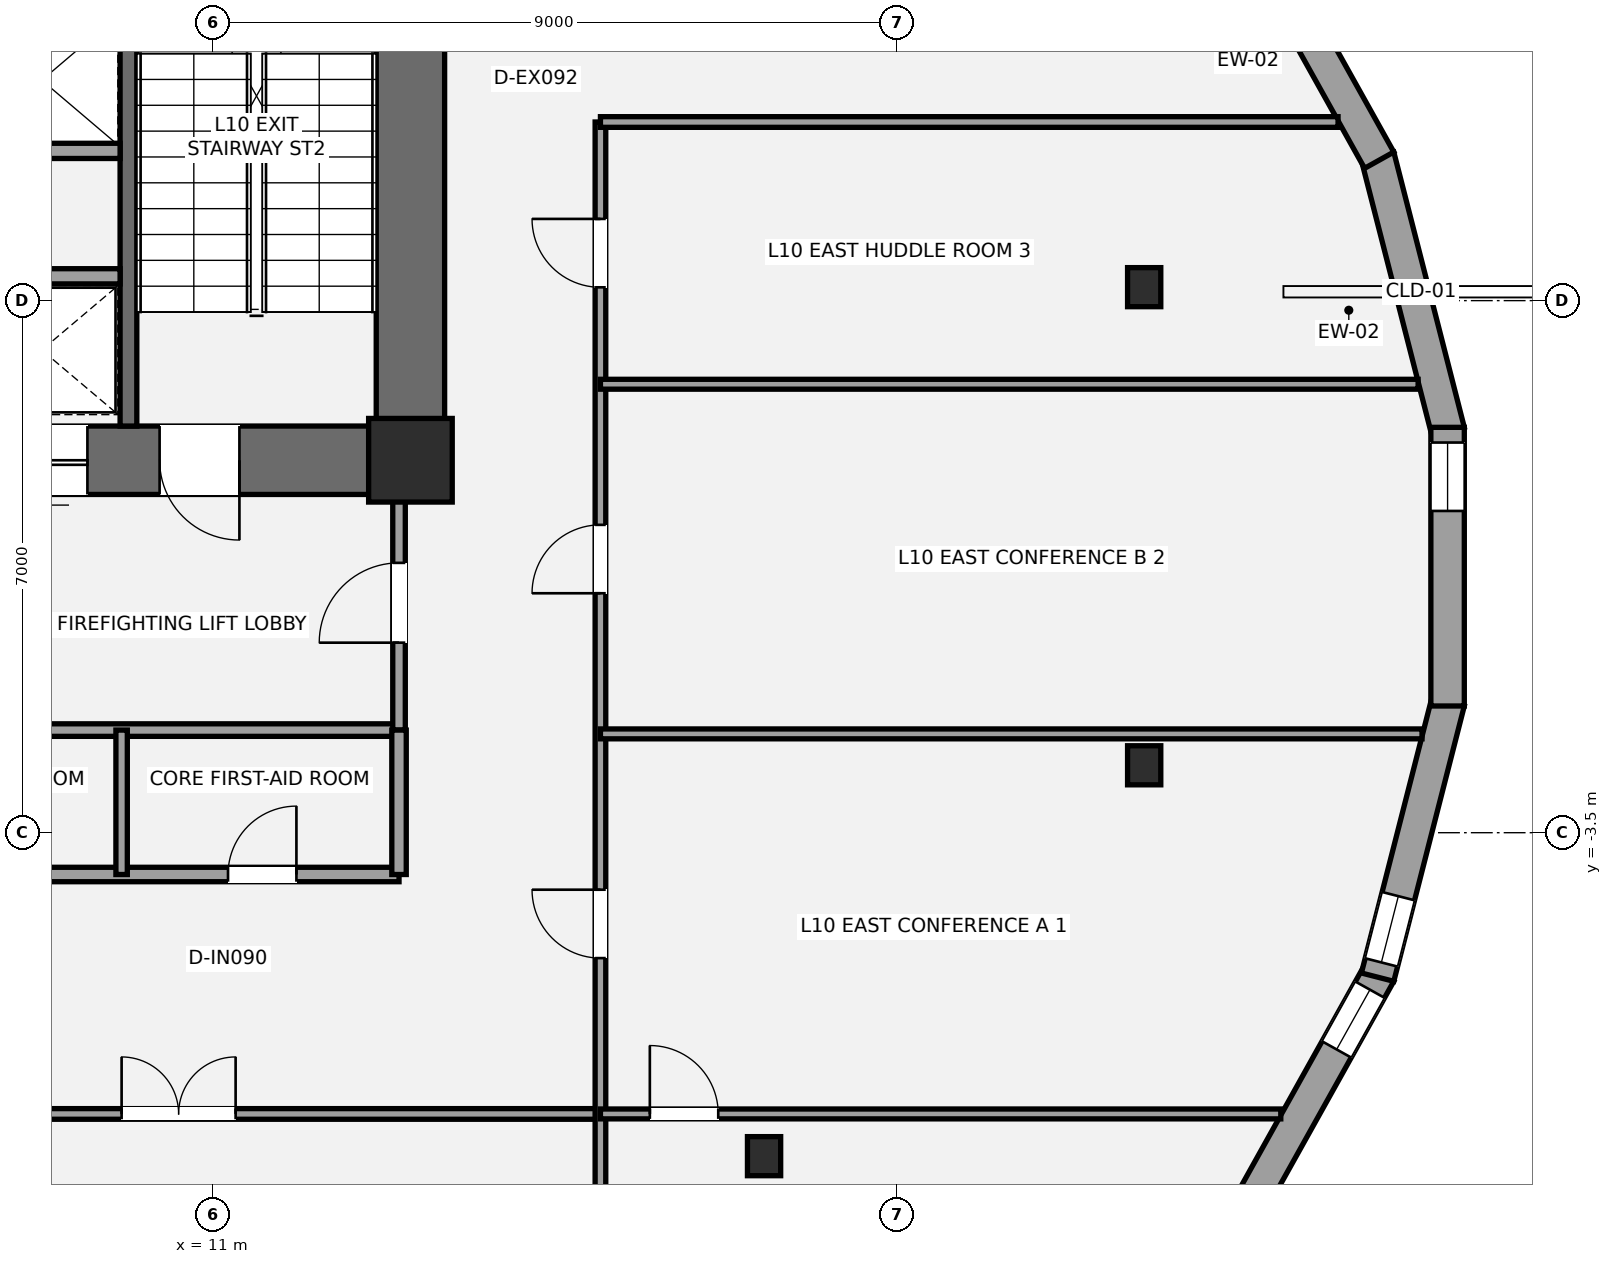
"""IFC4 building model, lengths in metres.
Left out: names, types, materials, properties, quantities, classifications, styles, units other than length and angle.
Written with IfcOpenShell. Run it as: python <this file> out.ifc"""

import sys

from ifc_helpers import new_model, si_unit, direction, frame, frame_2d, origin, origin_2d, place, context, subcontext, project, spatial, rectangle, i_section, extrude, element, fill, save


model = new_model("IFC4")
c1 = context("Model", 3, precision=1e-05, world=origin(), true_north=direction((0.0, 1.0)))
c2 = subcontext(c1, "Body", "Model", "MODEL_VIEW")
j1 = project(units=[si_unit("LENGTHUNIT", "METRE"), si_unit("PLANEANGLEUNIT", "RADIAN")], contexts=[c1])
p1 = place(None, origin())
s1 = spatial("IfcSite", under=j1, at=p1, CompositionType="ELEMENT")
p2 = place(p1, origin())
s2 = spatial("IfcBuilding", under=s1, at=p2, CompositionType="ELEMENT")
p3 = place(p2, frame((0.0, 0.0, 41.4)))
s3 = spatial("IfcBuildingStorey", under=s2, at=p3, CompositionType="ELEMENT", Elevation=41.4)
p4 = place(p3, frame((13.6, 0.95, 0.0), z_axis=(0.0, 0.0, 1.0), x_axis=(0.0, 1.0, 0.0)))
e1 = element("IfcWall", 1, at=p4, inside=s3, PredefinedType="SHEAR", context=c2, shape_type="SweptSolid", body=[
    extrude(rectangle(XDim=8.95, YDim=0.9, at=frame_2d((4.475, 0.0))), origin(), (0.0, 0.0, 1.0), 3.6),
])
p5 = place(p3, frame((14.05, 1.4, 0.0), z_axis=(0.0, 0.0, 1.0), x_axis=(-1.0, 0.0, 0.0)))
e2 = element("IfcWall", 2, at=p5, inside=s3, PredefinedType="SHEAR", context=c2, shape_type="SweptSolid", body=[
    extrude(rectangle(XDim=9.3, YDim=0.9, at=frame_2d((4.65, 0.0))), origin(), (0.0, 0.0, 1.0), 3.6),
])
p6 = place(p5, frame((2.7, 0.0, 0.0)))
e3 = element("IfcOpeningElement", 3, at=p6, cuts=e2, PredefinedType="OPENING", context=c2, shape_type="SweptSolid", body=[
    extrude(rectangle(XDim=1.05, YDim=2.15, at=frame_2d((0.525, 1.075))), frame((0.0, 0.46, 0.0), z_axis=(0.0, -1.0, 0.0), x_axis=(1.0, 0.0, 0.0)), (0.0, 0.0, 1.0), 0.92),
])
p7 = place(p5, frame((4.7, 0.0, 0.0)))
e4 = element("IfcOpeningElement", 4, at=p7, cuts=e2, PredefinedType="OPENING", context=c2, shape_type="SweptSolid", body=[
    extrude(rectangle(XDim=1.1, YDim=2.2, at=frame_2d((0.55, 1.1))), frame((0.0, 0.46, 0.0), z_axis=(0.0, -1.0, 0.0), x_axis=(1.0, 0.0, 0.0)), (0.0, 0.0, 1.0), 0.92),
])
p8 = place(p3, frame((9.89, 1.85, 0.0), z_axis=(0.0, 0.0, 1.0), x_axis=(0.0, 1.0, 0.0)))
e5 = element("IfcWall", 5, at=p8, inside=s3, PredefinedType="SHEAR", context=c2, shape_type="SweptSolid", body=[
    extrude(rectangle(XDim=7.15, YDim=0.22, at=frame_2d((3.575, 0.0))), origin(), (0.0, 0.0, 1.0), 3.6),
])
p9 = place(p3, frame((13.6, 1.4, 0.0), z_axis=(0.0, 0.0, 1.0), x_axis=(1.0, 0.0, 0.0)))
e6 = element("IfcColumn", 6, at=p9, inside=s3, PredefinedType="COLUMN", context=c2, shape_type="SweptSolid", body=[
    extrude(rectangle(XDim=1.1, YDim=1.1, at=origin_2d()), origin(), (0.0, 0.0, 1.0), 3.6),
])
for number, where, z_axis, x_axis in (
    (7, (23.254, 3.677, 0.0), (0.0, 0.0, 1.0), (1.0, 0.0, 0.0)),
    (8, (18.253, -7.756, 0.0), (0.0, 0.0, 1.0), (1.0, 0.0, 0.0)),
    (9, (23.254, -2.613, 0.0), (0.0, 0.0, 1.0), (1.0, 0.0, 0.0)),
):
    element("IfcColumn", number, at=place(p3, frame(where, z_axis=z_axis, x_axis=x_axis)), inside=s3, PredefinedType="COLUMN", context=c2, shape_type="SweptSolid", body=[
        extrude(i_section(OverallWidth=0.437, OverallDepth=0.514, WebThickness=0.061, FlangeThickness=0.097, at=origin_2d()), origin(), (0.0, 0.0, 1.0), 3.6),
    ])
p10 = place(p3, frame((26.325, 5.4, 0.0), z_axis=(0.0, 0.0, 1.0), x_axis=(0.248062710061, -0.968743976434, 0.0)))
e10 = element("IfcWall", 10, at=p10, inside=s3, PredefinedType="STANDARD", context=c2, shape_type="SweptSolid", body=[
    extrude(rectangle(XDim=3.739, YDim=0.44, at=frame_2d((1.87, 0.0))), origin(), (0.0, 0.0, 1.0), 2.529),
])
p11 = place(p3, frame((24.416, 8.806, 0.0), z_axis=(0.0, 0.0, 1.0), x_axis=(0.487369438963, -0.873195871477, 0.0)))
e11 = element("IfcWall", 11, at=p11, inside=s3, PredefinedType="STANDARD", context=c2, shape_type="SweptSolid", body=[
    extrude(rectangle(XDim=3.96, YDim=0.44, at=frame_2d((1.98, 0.0))), origin(), (0.0, 0.0, 1.0), 2.529),
])
p12 = place(p11, frame((0.249, 0.0, 0.58)))
e12 = element("IfcOpeningElement", 12, at=p12, cuts=e11, PredefinedType="OPENING", context=c2, shape_type="SweptSolid", body=[
    extrude(rectangle(XDim=0.9, YDim=1.35, at=frame_2d((0.45, 0.675))), frame((0.0, 0.23, 0.0), z_axis=(0.0, -1.0, 0.0), x_axis=(1.0, 0.0, 0.0)), (0.0, 0.0, 1.0), 0.46),
])
p13 = place(p3, frame((26.346, -5.348, 0.0), z_axis=(0.0, 0.0, 1.0), x_axis=(-0.487369438963, -0.873195871477, 0.0)))
e13 = element("IfcWall", 13, at=p13, inside=s3, PredefinedType="STANDARD", context=c2, shape_type="SweptSolid", body=[
    extrude(rectangle(XDim=3.96, YDim=0.44, at=frame_2d((1.98, 0.0))), origin(), (0.0, 0.0, 1.0), 2.529),
])
p14 = place(p13, frame((0.249, 0.0, 0.58)))
e14 = element("IfcOpeningElement", 14, at=p14, cuts=e13, PredefinedType="OPENING", context=c2, shape_type="SweptSolid", body=[
    extrude(rectangle(XDim=0.9, YDim=1.35, at=frame_2d((0.45, 0.675))), frame((0.0, 0.23, 0.0), z_axis=(0.0, -1.0, 0.0), x_axis=(1.0, 0.0, 0.0)), (0.0, 0.0, 1.0), 0.46),
])
p15 = place(p3, frame((27.253, -1.778, 0.0), z_axis=(0.0, 0.0, 1.0), x_axis=(-0.248062710061, -0.968743976434, 0.0)))
e15 = element("IfcWall", 15, at=p15, inside=s3, PredefinedType="STANDARD", context=c2, shape_type="SweptSolid", body=[
    extrude(rectangle(XDim=3.739, YDim=0.44, at=frame_2d((1.87, 0.0))), origin(), (0.0, 0.0, 1.0), 2.529),
])
p16 = place(p15, frame((2.639, 0.0, 0.42)))
e16 = element("IfcOpeningElement", 16, at=p16, cuts=e15, PredefinedType="OPENING", context=c2, shape_type="SweptSolid", body=[
    extrude(rectangle(XDim=0.9, YDim=1.35, at=frame_2d((0.45, 0.675))), frame((0.0, 0.23, 0.0), z_axis=(0.0, -1.0, 0.0), x_axis=(1.0, 0.0, 0.0)), (0.0, 0.0, 1.0), 0.46),
])
p17 = place(p3, frame((27.246, 1.833, 0.0), z_axis=(0.0, 0.0, 1.0), x_axis=(0.0, -1.0, 0.0)))
e17 = element("IfcWall", 17, at=p17, inside=s3, PredefinedType="STANDARD", context=c2, shape_type="SweptSolid", body=[
    extrude(rectangle(XDim=3.666, YDim=0.44, at=frame_2d((1.833, 0.0))), origin(), (0.0, 0.0, 1.0), 2.529),
])
p18 = place(p17, frame((0.2, 0.0, 0.42)))
e18 = element("IfcOpeningElement", 18, at=p18, cuts=e17, PredefinedType="OPENING", context=c2, shape_type="SweptSolid", body=[
    extrude(rectangle(XDim=0.9, YDim=1.35, at=frame_2d((0.45, 0.675))), frame((0.0, 0.23, 0.0), z_axis=(0.0, -1.0, 0.0), x_axis=(1.0, 0.0, 0.0)), (0.0, 0.0, 1.0), 0.46),
])
p19 = place(p3, frame((7.2, -2.15, 0.0), z_axis=(0.0, 0.0, 1.0), x_axis=(1.0, 0.0, 0.0)))
e19 = element("IfcWall", 19, at=p19, inside=s3, PredefinedType="PARTITIONING", context=c2, shape_type="SweptSolid", body=[
    extrude(rectangle(XDim=6.25, YDim=0.165, at=frame_2d((3.125, 0.0))), origin(), (0.0, 0.0, 1.0), 3.4),
])
p20 = place(p3, frame((13.45, -2.15, 0.0), z_axis=(0.0, 0.0, 1.0), x_axis=(0.0, 1.0, 0.0)))
e20 = element("IfcWall", 20, at=p20, inside=s3, PredefinedType="PARTITIONING", context=c2, shape_type="SweptSolid", body=[
    extrude(rectangle(XDim=3.15, YDim=0.165, at=frame_2d((1.575, 0.0))), origin(), (0.0, 0.0, 1.0), 2.853),
])
p21 = place(p20, frame((1.15, 0.0, 0.0)))
e21 = element("IfcOpeningElement", 21, at=p21, cuts=e20, PredefinedType="OPENING", context=c2, shape_type="SweptSolid", body=[
    extrude(rectangle(XDim=1.05, YDim=2.15, at=frame_2d((0.525, 1.075))), frame((0.0, 0.093, 0.0), z_axis=(0.0, -1.0, 0.0), x_axis=(1.0, 0.0, 0.0)), (0.0, 0.0, 1.0), 0.185),
])
p22 = place(p3, frame((5.65, 3.82, 0.0), z_axis=(0.0, 0.0, 1.0), x_axis=(1.0, 0.0, 0.0)))
e22 = element("IfcWall", 22, at=p22, inside=s3, PredefinedType="SOLIDWALL", context=c2, shape_type="SweptSolid", body=[
    extrude(rectangle(XDim=4.13, YDim=0.2, at=frame_2d((2.065, 0.0))), origin(), (0.0, 0.0, 1.0), 3.4),
])
p23 = place(p22, frame((0.65, 0.0, 0.0)))
e23 = element("IfcOpeningElement", 23, at=p23, cuts=e22, PredefinedType="OPENING", context=c2, shape_type="SweptSolid", body=[
    extrude(rectangle(XDim=1.2, YDim=2.2, at=frame_2d((0.6, 1.1))), frame((0.0, 0.11, 0.0), z_axis=(0.0, -1.0, 0.0), x_axis=(1.0, 0.0, 0.0)), (0.0, 0.0, 1.0), 0.22),
])
p24 = place(p3, frame((5.65, 5.47, 0.0), z_axis=(0.0, 0.0, 1.0), x_axis=(1.0, 0.0, 0.0)))
e24 = element("IfcWall", 24, at=p24, inside=s3, PredefinedType="SOLIDWALL", context=c2, shape_type="SweptSolid", body=[
    extrude(rectangle(XDim=4.13, YDim=0.2, at=frame_2d((2.065, 0.0))), origin(), (0.0, 0.0, 1.0), 3.4),
])
p25 = place(p3, frame((2.1, -4.05, 0.0), z_axis=(0.0, 0.0, 1.0), x_axis=(1.0, 0.0, 0.0)))
e25 = element("IfcWall", 25, at=p25, inside=s3, PredefinedType="PLUMBINGWALL", context=c2, shape_type="SweptSolid", body=[
    extrude(rectangle(XDim=11.35, YDim=0.19, at=frame_2d((5.675, 0.0))), origin(), (0.0, 0.0, 1.0), 2.933),
])
p26 = place(p25, frame((1.4, 0.0, 0.0)))
e26 = element("IfcOpeningElement", 26, at=p26, cuts=e25, PredefinedType="OPENING", context=c2, shape_type="SweptSolid", body=[
    extrude(rectangle(XDim=0.9, YDim=2.1, at=frame_2d((0.45, 1.05))), frame((0.0, 0.105, 0.0), z_axis=(0.0, -1.0, 0.0), x_axis=(1.0, 0.0, 0.0)), (0.0, 0.0, 1.0), 0.21),
])
p27 = place(p25, frame((5.3, 0.0, 0.0)))
e27 = element("IfcOpeningElement", 27, at=p27, cuts=e25, PredefinedType="OPENING", context=c2, shape_type="SweptSolid", body=[
    extrude(rectangle(XDim=0.9, YDim=2.1, at=frame_2d((0.45, 1.05))), frame((0.0, 0.105, 0.0), z_axis=(0.0, -1.0, 0.0), x_axis=(1.0, 0.0, 0.0)), (0.0, 0.0, 1.0), 0.21),
])
p28 = place(p25, frame((9.1, 0.0, 0.0)))
e28 = element("IfcOpeningElement", 28, at=p28, cuts=e25, PredefinedType="OPENING", context=c2, shape_type="SweptSolid", body=[
    extrude(rectangle(XDim=0.9, YDim=2.1, at=frame_2d((0.45, 1.05))), frame((0.0, 0.105, 0.0), z_axis=(0.0, -1.0, 0.0), x_axis=(1.0, 0.0, 0.0)), (0.0, 0.0, 1.0), 0.21),
])
p29 = place(p3, frame((13.45, -4.05, 0.0), z_axis=(0.0, 0.0, 1.0), x_axis=(0.0, 1.0, 0.0)))
e29 = element("IfcWall", 29, at=p29, inside=s3, PredefinedType="PLUMBINGWALL", context=c2, shape_type="SweptSolid", body=[
    extrude(rectangle(XDim=1.9, YDim=0.19, at=frame_2d((0.95, 0.0))), origin(), (0.0, 0.0, 1.0), 2.853),
])
p30 = place(p3, frame((9.8, -4.05, 0.0), z_axis=(0.0, 0.0, 1.0), x_axis=(0.0, 1.0, 0.0)))
e30 = element("IfcWall", 30, at=p30, inside=s3, PredefinedType="PLUMBINGWALL", context=c2, shape_type="SweptSolid", body=[
    extrude(rectangle(XDim=1.9, YDim=0.15, at=frame_2d((0.95, 0.0))), origin(), (0.0, 0.0, 1.0), 2.853),
])
p31 = place(p3, frame((-17.8, -7.2, 0.0), z_axis=(0.0, 0.0, 1.0), x_axis=(1.0, 0.0, 0.0)))
e31 = element("IfcWall", 31, at=p31, inside=s3, PredefinedType="PARTITIONING", context=c2, shape_type="SweptSolid", body=[
    extrude(rectangle(XDim=33.9, YDim=0.14, at=frame_2d((16.95, 0.0))), origin(), (0.0, 0.0, 1.0), 2.853),
])
p32 = place(p31, frame((5.65, 0.0, 0.0)))
e32 = element("IfcOpeningElement", 32, at=p32, cuts=e31, PredefinedType="OPENING", context=c2, shape_type="SweptSolid", body=[
    extrude(rectangle(XDim=1.5, YDim=2.15, at=frame_2d((0.75, 1.075))), frame((0.0, 0.08, 0.0), z_axis=(0.0, -1.0, 0.0), x_axis=(1.0, 0.0, 0.0)), (0.0, 0.0, 1.0), 0.16),
])
p33 = place(p31, frame((17.05, 0.0, 0.0)))
e33 = element("IfcOpeningElement", 33, at=p33, cuts=e31, PredefinedType="OPENING", context=c2, shape_type="SweptSolid", body=[
    extrude(rectangle(XDim=1.5, YDim=2.15, at=frame_2d((0.75, 1.075))), frame((0.0, 0.08, 0.0), z_axis=(0.0, -1.0, 0.0), x_axis=(1.0, 0.0, 0.0)), (0.0, 0.0, 1.0), 0.16),
])
p34 = place(p31, frame((27.6, 0.0, 0.0)))
e34 = element("IfcOpeningElement", 34, at=p34, cuts=e31, PredefinedType="OPENING", context=c2, shape_type="SweptSolid", body=[
    extrude(rectangle(XDim=1.5, YDim=2.15, at=frame_2d((0.75, 1.075))), frame((0.0, 0.08, 0.0), z_axis=(0.0, -1.0, 0.0), x_axis=(1.0, 0.0, 0.0)), (0.0, 0.0, 1.0), 0.16),
])
p35 = place(p3, frame((16.1, -14.922, 0.0), z_axis=(0.0, 0.0, 1.0), x_axis=(0.0, 1.0, 0.0)))
e35 = element("IfcWall", 35, at=p35, inside=s3, PredefinedType="PARTITIONING", context=c2, shape_type="SweptSolid", body=[
    extrude(rectangle(XDim=20.772, YDim=0.14, at=frame_2d((10.386, 0.0))), origin(), (0.0, 0.0, 1.0), 2.841),
])
p36 = place(p35, frame((9.772, 0.0, 0.0)))
e36 = element("IfcOpeningElement", 36, at=p36, cuts=e35, PredefinedType="OPENING", context=c2, shape_type="SweptSolid", body=[
    extrude(rectangle(XDim=0.9, YDim=2.1, at=frame_2d((0.45, 1.05))), frame((0.0, 0.08, 0.0), z_axis=(0.0, -1.0, 0.0), x_axis=(1.0, 0.0, 0.0)), (0.0, 0.0, 1.0), 0.16),
])
p37 = place(p35, frame((14.572, 0.0, 0.0)))
e37 = element("IfcOpeningElement", 37, at=p37, cuts=e35, PredefinedType="OPENING", context=c2, shape_type="SweptSolid", body=[
    extrude(rectangle(XDim=0.9, YDim=2.1, at=frame_2d((0.45, 1.05))), frame((0.0, 0.08, 0.0), z_axis=(0.0, -1.0, 0.0), x_axis=(1.0, 0.0, 0.0)), (0.0, 0.0, 1.0), 0.16),
])
p38 = place(p35, frame((18.597, 0.0, 0.0)))
e38 = element("IfcOpeningElement", 38, at=p38, cuts=e35, PredefinedType="OPENING", context=c2, shape_type="SweptSolid", body=[
    extrude(rectangle(XDim=0.9, YDim=2.1, at=frame_2d((0.45, 1.05))), frame((0.0, 0.08, 0.0), z_axis=(0.0, -1.0, 0.0), x_axis=(1.0, 0.0, 0.0)), (0.0, 0.0, 1.0), 0.16),
])
p39 = place(p3, frame((16.1, 5.85, 0.0), z_axis=(0.0, 0.0, 1.0), x_axis=(1.0, 0.0, 0.0)))
e39 = element("IfcWall", 39, at=p39, inside=s3, PredefinedType="PARTITIONING", context=c2, shape_type="SweptSolid", body=[
    extrude(rectangle(XDim=9.705, YDim=0.14, at=frame_2d((4.852, 0.0))), origin(), (0.0, 0.0, 1.0), 3.4),
])
p40 = place(p3, frame((16.1, -7.2, 0.0), z_axis=(0.0, 0.0, 1.0), x_axis=(1.0, 0.0, 0.0)))
e40 = element("IfcWall", 40, at=p40, inside=s3, PredefinedType="PARTITIONING", context=c2, shape_type="SweptSolid", body=[
    extrude(rectangle(XDim=8.951, YDim=0.13, at=frame_2d((4.476, 0.0))), origin(), (0.0, 0.0, 1.0), 2.779),
])
p41 = place(p40, frame((0.65, 0.0, 0.0)))
e41 = element("IfcOpeningElement", 41, at=p41, cuts=e40, PredefinedType="OPENING", context=c2, shape_type="SweptSolid", body=[
    extrude(rectangle(XDim=0.9, YDim=2.1, at=frame_2d((0.45, 1.05))), frame((0.0, 0.075, 0.0), z_axis=(0.0, -1.0, 0.0), x_axis=(1.0, 0.0, 0.0)), (0.0, 0.0, 1.0), 0.15),
])
p42 = place(p3, frame((16.1, -2.2, 0.0), z_axis=(0.0, 0.0, 1.0), x_axis=(1.0, 0.0, 0.0)))
e42 = element("IfcWall", 42, at=p42, inside=s3, PredefinedType="PARTITIONING", context=c2, shape_type="SweptSolid", body=[
    extrude(rectangle(XDim=10.809, YDim=0.13, at=frame_2d((5.405, 0.0))), origin(), (0.0, 0.0, 1.0), 2.841),
])
p43 = place(p3, frame((16.1, 2.4, 0.0), z_axis=(0.0, 0.0, 1.0), x_axis=(1.0, 0.0, 0.0)))
e43 = element("IfcWall", 43, at=p43, inside=s3, PredefinedType="PARTITIONING", context=c2, shape_type="SweptSolid", body=[
    extrude(rectangle(XDim=10.758, YDim=0.13, at=frame_2d((5.379, 0.0))), origin(), (0.0, 0.0, 1.0), 2.841),
])
p44 = place(p14, origin())
e44 = element("IfcWindow", 44, at=p44, inside=s3, PartitioningType="SINGLE_PANEL", PredefinedType="WINDOW", context=c2, shape_type="SweptSolid", body=[
    extrude(rectangle(XDim=0.9, YDim=1.35, at=frame_2d((0.45, 0.675))), frame((0.0, -0.01, 0.0), z_axis=(0.0, -1.0, 0.0), x_axis=(1.0, 0.0, 0.0)), (0.0, 0.0, 1.0), 0.06),
])
fill(e14, e44)
p45 = place(p16, origin())
e45 = element("IfcWindow", 45, at=p45, inside=s3, PartitioningType="SINGLE_PANEL", PredefinedType="WINDOW", context=c2, shape_type="SweptSolid", body=[
    extrude(rectangle(XDim=0.9, YDim=1.35, at=frame_2d((0.45, 0.675))), frame((0.0, -0.01, 0.0), z_axis=(0.0, -1.0, 0.0), x_axis=(1.0, 0.0, 0.0)), (0.0, 0.0, 1.0), 0.06),
])
fill(e16, e45)
p46 = place(p18, origin())
e46 = element("IfcWindow", 46, at=p46, inside=s3, PartitioningType="SINGLE_PANEL", PredefinedType="WINDOW", context=c2, shape_type="SweptSolid", body=[
    extrude(rectangle(XDim=0.9, YDim=1.35, at=frame_2d((0.45, 0.675))), frame((0.0, -0.01, 0.0), z_axis=(0.0, -1.0, 0.0), x_axis=(1.0, 0.0, 0.0)), (0.0, 0.0, 1.0), 0.06),
])
fill(e18, e46)
p47 = place(p6, origin())
e47 = element("IfcDoor", 47, at=p47, inside=s3, OperationType="SINGLE_SWING_LEFT", PredefinedType="DOOR", context=c2, shape_type="SweptSolid", body=[
    extrude(rectangle(XDim=1.05, YDim=2.15, at=frame_2d((0.525, 1.075))), frame((0.0, 0.025, 0.0), z_axis=(0.0, -1.0, 0.0), x_axis=(1.0, 0.0, 0.0)), (0.0, 0.0, 1.0), 0.05),
])
fill(e3, e47)
p48 = place(p21, origin())
e48 = element("IfcDoor", 48, at=p48, inside=s3, OperationType="SINGLE_SWING_LEFT", PredefinedType="DOOR", context=c2, shape_type="SweptSolid", body=[
    extrude(rectangle(XDim=1.05, YDim=2.15, at=frame_2d((0.525, 1.075))), frame((0.0, 0.025, 0.0), z_axis=(0.0, -1.0, 0.0), x_axis=(1.0, 0.0, 0.0)), (0.0, 0.0, 1.0), 0.05),
])
fill(e21, e48)
p49 = place(p7, origin())
e49 = element("IfcDoor", 49, at=p49, inside=s3, OperationType="SLIDING_TO_LEFT", PredefinedType="DOOR", context=c2, shape_type="SweptSolid", body=[
    extrude(rectangle(XDim=1.1, YDim=2.2, at=frame_2d((0.55, 1.1))), frame((0.0, 0.025, 0.0), z_axis=(0.0, -1.0, 0.0), x_axis=(1.0, 0.0, 0.0)), (0.0, 0.0, 1.0), 0.05),
])
fill(e4, e49)
p50 = place(p28, origin())
e50 = element("IfcDoor", 50, at=p50, inside=s3, OperationType="SINGLE_SWING_RIGHT", PredefinedType="DOOR", context=c2, shape_type="SweptSolid", body=[
    extrude(rectangle(XDim=0.9, YDim=2.1, at=frame_2d((0.45, 1.05))), frame((0.0, 0.025, 0.0), z_axis=(0.0, -1.0, 0.0), x_axis=(1.0, 0.0, 0.0)), (0.0, 0.0, 1.0), 0.05),
])
fill(e28, e50)
p51 = place(p34, origin())
e51 = element("IfcDoor", 51, at=p51, inside=s3, OperationType="DOUBLE_DOOR_SINGLE_SWING", PredefinedType="DOOR", context=c2, shape_type="SweptSolid", body=[
    extrude(rectangle(XDim=1.5, YDim=2.15, at=frame_2d((0.75, 1.075))), frame((0.0, 0.025, 0.0), z_axis=(0.0, -1.0, 0.0), x_axis=(1.0, 0.0, 0.0)), (0.0, 0.0, 1.0), 0.05),
])
fill(e34, e51)
p52 = place(p41, origin())
e52 = element("IfcDoor", 52, at=p52, inside=s3, OperationType="SINGLE_SWING_LEFT", PredefinedType="DOOR", context=c2, shape_type="SweptSolid", body=[
    extrude(rectangle(XDim=0.9, YDim=2.1, at=frame_2d((0.45, 1.05))), frame((0.0, 0.025, 0.0), z_axis=(0.0, -1.0, 0.0), x_axis=(1.0, 0.0, 0.0)), (0.0, 0.0, 1.0), 0.05),
])
fill(e41, e52)
p53 = place(p36, origin())
e53 = element("IfcDoor", 53, at=p53, inside=s3, OperationType="SINGLE_SWING_RIGHT", PredefinedType="DOOR", context=c2, shape_type="SweptSolid", body=[
    extrude(rectangle(XDim=0.9, YDim=2.1, at=frame_2d((0.45, 1.05))), frame((0.0, 0.025, 0.0), z_axis=(0.0, -1.0, 0.0), x_axis=(1.0, 0.0, 0.0)), (0.0, 0.0, 1.0), 0.05),
])
fill(e36, e53)
p54 = place(p37, origin())
e54 = element("IfcDoor", 54, at=p54, inside=s3, OperationType="SINGLE_SWING_LEFT", PredefinedType="DOOR", context=c2, shape_type="SweptSolid", body=[
    extrude(rectangle(XDim=0.9, YDim=2.1, at=frame_2d((0.45, 1.05))), frame((0.0, 0.025, 0.0), z_axis=(0.0, -1.0, 0.0), x_axis=(1.0, 0.0, 0.0)), (0.0, 0.0, 1.0), 0.05),
])
fill(e37, e54)
p55 = place(p38, origin())
e55 = element("IfcDoor", 55, at=p55, inside=s3, OperationType="SINGLE_SWING_RIGHT", PredefinedType="DOOR", context=c2, shape_type="SweptSolid", body=[
    extrude(rectangle(XDim=0.9, YDim=2.1, at=frame_2d((0.45, 1.05))), frame((0.0, 0.025, 0.0), z_axis=(0.0, -1.0, 0.0), x_axis=(1.0, 0.0, 0.0)), (0.0, 0.0, 1.0), 0.05),
])
fill(e38, e55)
save(model, sys.argv[1])
